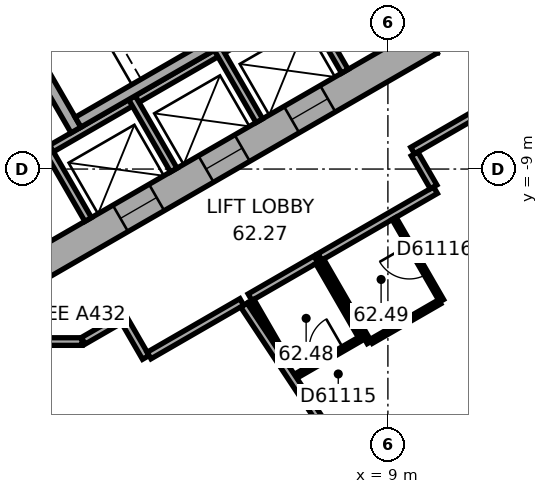
"""IFC4 building model, lengths in metres.
Left out: names, types, materials, properties, quantities, classifications, styles, units other than length and angle.
Written with IfcOpenShell. Run it as: python <this file> out.ifc"""

import sys

from ifc_helpers import new_model, si_unit, direction, frame, frame_2d, origin, place, context, subcontext, project, spatial, rectangle, extrude, element, fill, save


model = new_model("IFC4")
c1 = context("Model", 3, precision=1e-05, world=origin(), true_north=direction((0.0, 1.0)))
c2 = subcontext(c1, "Body", "Model", "MODEL_VIEW")
j1 = project(units=[si_unit("LENGTHUNIT", "METRE"), si_unit("PLANEANGLEUNIT", "RADIAN")], contexts=[c1])
p1 = place(None, origin())
s1 = spatial("IfcSite", under=j1, at=p1, CompositionType="ELEMENT")
p2 = place(p1, origin())
s2 = spatial("IfcBuilding", under=s1, at=p2, CompositionType="ELEMENT")
p3 = place(p2, frame((0.0, 0.0, 251.3)))
s3 = spatial("IfcBuildingStorey", under=s2, at=p3, CompositionType="ELEMENT", Elevation=251.3)
p4 = place(p3, frame((9.9, -5.947, 0.0), z_axis=(0.0, 0.0, 1.0), x_axis=(0.0, 1.0, 0.0)))
e1 = element("IfcWall", 1, at=p4, inside=s3, PredefinedType="SHEAR", context=c2, shape_type="SweptSolid", body=[
    extrude(rectangle(XDim=11.894, YDim=0.8, at=frame_2d((5.947, 0.0))), origin(), (0.0, 0.0, 1.0), 3.7),
])
p5 = place(p4, frame((6.147, 0.0, 0.0)))
e2 = element("IfcOpeningElement", 2, at=p5, cuts=e1, PredefinedType="OPENING", context=c2, shape_type="SweptSolid", body=[
    extrude(rectangle(XDim=1.5, YDim=2.1, at=frame_2d((0.75, 1.05))), frame((0.0, 0.41, 0.0), z_axis=(0.0, -1.0, 0.0), x_axis=(1.0, 0.0, 0.0)), (0.0, 0.0, 1.0), 0.82),
])
p6 = place(p4, frame((1.697, 0.0, 0.0)))
e3 = element("IfcOpeningElement", 3, at=p6, cuts=e1, PredefinedType="OPENING", context=c2, shape_type="SweptSolid", body=[
    extrude(rectangle(XDim=0.9, YDim=2.1, at=frame_2d((0.45, 1.05))), frame((0.0, 0.41, 0.0), z_axis=(0.0, -1.0, 0.0), x_axis=(1.0, 0.0, 0.0)), (0.0, 0.0, 1.0), 0.82),
])
p7 = place(p4, frame((4.297, 0.0, 0.0)))
e4 = element("IfcOpeningElement", 4, at=p7, cuts=e1, PredefinedType="OPENING", context=c2, shape_type="SweptSolid", body=[
    extrude(rectangle(XDim=0.9, YDim=2.1, at=frame_2d((0.45, 1.05))), frame((0.0, 0.41, 0.0), z_axis=(0.0, -1.0, 0.0), x_axis=(1.0, 0.0, 0.0)), (0.0, 0.0, 1.0), 0.82),
])
p8 = place(p3, frame((-10.1, -5.6, 0.0), z_axis=(0.0, 0.0, 1.0), x_axis=(0.866023897231, -0.500002609418, 0.0)))
e5 = element("IfcWall", 5, at=p8, inside=s3, PredefinedType="SHEAR", context=c2, shape_type="SweptSolid", body=[
    extrude(rectangle(XDim=11.894, YDim=0.8, at=frame_2d((5.947, 0.0))), origin(), (0.0, 0.0, 1.0), 3.7),
])
p9 = place(p8, frame((6.147, 0.0, 0.0)))
e6 = element("IfcOpeningElement", 6, at=p9, cuts=e5, PredefinedType="OPENING", context=c2, shape_type="SweptSolid", body=[
    extrude(rectangle(XDim=1.5, YDim=2.1, at=frame_2d((0.75, 1.05))), frame((0.0, 0.41, 0.0), z_axis=(0.0, -1.0, 0.0), x_axis=(1.0, 0.0, 0.0)), (0.0, 0.0, 1.0), 0.82),
])
p10 = place(p8, frame((1.597, 0.0, 0.0)))
e7 = element("IfcOpeningElement", 7, at=p10, cuts=e5, PredefinedType="OPENING", context=c2, shape_type="SweptSolid", body=[
    extrude(rectangle(XDim=1.1, YDim=2.1, at=frame_2d((0.55, 1.05))), frame((0.0, 0.41, 0.0), z_axis=(0.0, -1.0, 0.0), x_axis=(1.0, 0.0, 0.0)), (0.0, 0.0, 1.0), 0.82),
])
p11 = place(p8, frame((4.197, 0.0, 0.0)))
e8 = element("IfcOpeningElement", 8, at=p11, cuts=e5, PredefinedType="OPENING", context=c2, shape_type="SweptSolid", body=[
    extrude(rectangle(XDim=1.1, YDim=2.1, at=frame_2d((0.55, 1.05))), frame((0.0, 0.41, 0.0), z_axis=(0.0, -1.0, 0.0), x_axis=(1.0, 0.0, 0.0)), (0.0, 0.0, 1.0), 0.82),
])
p12 = place(p3, frame((-0.2, -11.547, 0.0), z_axis=(0.0, 0.0, 1.0), x_axis=(0.866023897231, 0.500002609418, 0.0)))
e9 = element("IfcWall", 9, at=p12, inside=s3, PredefinedType="SHEAR", context=c2, shape_type="SweptSolid", body=[
    extrude(rectangle(XDim=11.894, YDim=0.8, at=frame_2d((5.947, 0.0))), origin(), (0.0, 0.0, 1.0), 3.7),
])
p13 = place(p12, frame((2.497, 0.0, 0.0)))
e10 = element("IfcOpeningElement", 10, at=p13, cuts=e9, PredefinedType="OPENING", context=c2, shape_type="SweptSolid", body=[
    extrude(rectangle(XDim=1.1, YDim=2.1, at=frame_2d((0.55, 1.05))), frame((0.0, 0.41, 0.0), z_axis=(0.0, -1.0, 0.0), x_axis=(1.0, 0.0, 0.0)), (0.0, 0.0, 1.0), 0.82),
])
p14 = place(p12, frame((5.097, 0.0, 0.0)))
e11 = element("IfcOpeningElement", 11, at=p14, cuts=e9, PredefinedType="OPENING", context=c2, shape_type="SweptSolid", body=[
    extrude(rectangle(XDim=1.1, YDim=2.1, at=frame_2d((0.55, 1.05))), frame((0.0, 0.41, 0.0), z_axis=(0.0, -1.0, 0.0), x_axis=(1.0, 0.0, 0.0)), (0.0, 0.0, 1.0), 0.82),
])
p15 = place(p12, frame((7.697, 0.0, 0.0)))
e12 = element("IfcOpeningElement", 12, at=p15, cuts=e9, PredefinedType="OPENING", context=c2, shape_type="SweptSolid", body=[
    extrude(rectangle(XDim=1.1, YDim=2.1, at=frame_2d((0.55, 1.05))), frame((0.0, 0.41, 0.0), z_axis=(0.0, -1.0, 0.0), x_axis=(1.0, 0.0, 0.0)), (0.0, 0.0, 1.0), 0.82),
])
p16 = place(p3, frame((2.739, -22.711, 0.0), z_axis=(0.0, 0.0, 1.0), x_axis=(0.833885723098, 0.551937134838, 0.0)))
e13 = element("IfcWall", 13, at=p16, inside=s3, PredefinedType="STANDARD", context=c2, shape_type="SweptSolid", body=[
    extrude(rectangle(XDim=18.841, YDim=0.2, at=frame_2d((9.421, 0.0))), origin(), (0.0, 0.0, 1.0), 3.7),
])
p17 = place(p16, frame((1.252, 0.0, 0.9)))
e14 = element("IfcOpeningElement", 14, at=p17, cuts=e13, PredefinedType="OPENING", context=c2, shape_type="SweptSolid", body=[
    extrude(rectangle(XDim=2.2, YDim=2.0, at=frame_2d((1.1, 1.0))), frame((0.0, 0.11, 0.0), z_axis=(0.0, -1.0, 0.0), x_axis=(1.0, 0.0, 0.0)), (0.0, 0.0, 1.0), 0.22),
])
p18 = place(p16, frame((4.786, 0.0, 0.9)))
e15 = element("IfcOpeningElement", 15, at=p18, cuts=e13, PredefinedType="OPENING", context=c2, shape_type="SweptSolid", body=[
    extrude(rectangle(XDim=2.2, YDim=2.0, at=frame_2d((1.1, 1.0))), frame((0.0, 0.11, 0.0), z_axis=(0.0, -1.0, 0.0), x_axis=(1.0, 0.0, 0.0)), (0.0, 0.0, 1.0), 0.22),
])
p19 = place(p16, frame((8.32, 0.0, 0.9)))
e16 = element("IfcOpeningElement", 16, at=p19, cuts=e13, PredefinedType="OPENING", context=c2, shape_type="SweptSolid", body=[
    extrude(rectangle(XDim=2.2, YDim=2.0, at=frame_2d((1.1, 1.0))), frame((0.0, 0.11, 0.0), z_axis=(0.0, -1.0, 0.0), x_axis=(1.0, 0.0, 0.0)), (0.0, 0.0, 1.0), 0.22),
])
p20 = place(p16, frame((11.854, 0.0, 0.9)))
e17 = element("IfcOpeningElement", 17, at=p20, cuts=e13, PredefinedType="OPENING", context=c2, shape_type="SweptSolid", body=[
    extrude(rectangle(XDim=2.2, YDim=2.0, at=frame_2d((1.1, 1.0))), frame((0.0, 0.11, 0.0), z_axis=(0.0, -1.0, 0.0), x_axis=(1.0, 0.0, 0.0)), (0.0, 0.0, 1.0), 0.22),
])
p21 = place(p16, frame((15.387, 0.0, 0.9)))
e18 = element("IfcOpeningElement", 18, at=p21, cuts=e13, PredefinedType="OPENING", context=c2, shape_type="SweptSolid", body=[
    extrude(rectangle(XDim=2.2, YDim=2.0, at=frame_2d((1.1, 1.0))), frame((0.0, 0.11, 0.0), z_axis=(0.0, -1.0, 0.0), x_axis=(1.0, 0.0, 0.0)), (0.0, 0.0, 1.0), 0.22),
])
p22 = place(p3, frame((-0.024, -8.559, 0.0), z_axis=(0.0, 0.0, 1.0), x_axis=(0.866026010844, 0.49999894854, 0.0)))
e19 = element("IfcWall", 19, at=p22, inside=s3, PredefinedType="PARTITIONING", context=c2, shape_type="SweptSolid", body=[
    extrude(rectangle(XDim=8.0, YDim=0.2, at=frame_2d((4.0, 0.0))), origin(), (0.0, 0.0, 1.0), 3.35),
])
for number, where, z_axis, x_axis in (
    (20, (0.013, -8.422, 0.0), (0.0, 0.0, 1.0), (0.5, -0.866, 0.0)),
    (21, (2.264, -7.122, 0.0), (0.0, 0.0, 1.0), (0.5, -0.866, 0.0)),
    (22, (4.516, -5.822, 0.0), (0.0, 0.0, 1.0), (0.5, -0.866, 0.0)),
    (23, (6.768, -4.522, 0.0), (0.0, 0.0, 1.0), (0.5, -0.866, 0.0)),
):
    element("IfcWall", number, at=place(p3, frame(where, z_axis=z_axis, x_axis=x_axis)), inside=s3, PredefinedType="PARTITIONING", context=c2, shape_type="SweptSolid", body=[
        extrude(rectangle(XDim=2.2, YDim=0.2, at=frame_2d((1.1, 0.0))), origin(), (0.0, 0.0, 1.0), 3.35),
    ])
p23 = place(p3, frame((-1.558, -3.902, 0.0), z_axis=(0.0, 0.0, 1.0), x_axis=(0.499977259774, -0.866038532462, 0.0)))
e24 = element("IfcWall", 24, at=p23, inside=s3, PredefinedType="SHEAR", context=c2, shape_type="SweptSolid", body=[
    extrude(rectangle(XDim=4.7, YDim=0.3, at=frame_2d((2.35, 0.0))), origin(), (0.0, 0.0, 1.0), 3.35),
])
p24 = place(p23, frame((0.8, 0.0, 0.0)))
e25 = element("IfcOpeningElement", 25, at=p24, cuts=e24, PredefinedType="OPENING", context=c2, shape_type="SweptSolid", body=[
    extrude(rectangle(XDim=1.2, YDim=2.1, at=frame_2d((0.6, 1.05))), frame((0.0, 0.16, 0.0), z_axis=(0.0, -1.0, 0.0), x_axis=(1.0, 0.0, 0.0)), (0.0, 0.0, 1.0), 0.32),
])
p25 = place(p3, frame((0.847, -7.767, 0.0), z_axis=(0.0, 0.0, 1.0), x_axis=(0.866027801685, 0.499995846692, 0.0)))
e26 = element("IfcWall", 26, at=p25, inside=s3, PredefinedType="SHEAR", context=c2, shape_type="SweptSolid", body=[
    extrude(rectangle(XDim=7.06, YDim=0.3, at=frame_2d((3.53, 0.0))), origin(), (0.0, 0.0, 1.0), 3.35),
])
p26 = place(p3, frame((-0.91, -13.539, 0.0), z_axis=(0.0, 0.0, 1.0), x_axis=(1.0, 0.0, 0.0)))
e27 = element("IfcWall", 27, at=p26, inside=s3, PredefinedType="PARTITIONING", context=c2, shape_type="SweptSolid", body=[
    extrude(rectangle(XDim=1.86, YDim=0.2, at=frame_2d((0.93, 0.0))), origin(), (0.0, 0.0, 1.0), 3.35),
])
p27 = place(p3, frame((0.985, -13.519, 0.0), z_axis=(0.0, 0.0, 1.0), x_axis=(0.866054082991, 0.499950322867, 0.0)))
e28 = element("IfcWall", 28, at=p27, inside=s3, PredefinedType="PARTITIONING", context=c2, shape_type="SweptSolid", body=[
    extrude(rectangle(XDim=1.206, YDim=0.2, at=frame_2d((0.603, 0.0))), origin(), (0.0, 0.0, 1.0), 3.35),
])
p28 = place(p3, frame((2.079, -13.003, 0.0), z_axis=(0.0, 0.0, 1.0), x_axis=(0.500074377092, -0.865982457891, 0.0)))
e29 = element("IfcWall", 29, at=p28, inside=s3, PredefinedType="PARTITIONING", context=c2, shape_type="SweptSolid", body=[
    extrude(rectangle(XDim=1.101, YDim=0.2, at=frame_2d((0.55, 0.0))), origin(), (0.0, 0.0, 1.0), 3.35),
])
p29 = place(p3, frame((2.716, -13.906, 0.0), z_axis=(0.0, 0.0, 1.0), x_axis=(0.866048512801, 0.499959971872, 0.0)))
e30 = element("IfcWall", 30, at=p29, inside=s3, PredefinedType="PARTITIONING", context=c2, shape_type="SweptSolid", body=[
    extrude(rectangle(XDim=2.818, YDim=0.2, at=frame_2d((1.409, 0.0))), origin(), (0.0, 0.0, 1.0), 3.35),
])
p30 = place(p3, frame((5.373, -12.372, 0.0), z_axis=(0.0, 0.0, 1.0), x_axis=(0.866010750942, 0.50002537861, 0.0)))
e31 = element("IfcWall", 31, at=p30, inside=s3, PredefinedType="PARTITIONING", context=c2, shape_type="SweptSolid", body=[
    extrude(rectangle(XDim=2.0, YDim=0.2, at=frame_2d((1.0, 0.0))), origin(), (0.0, 0.0, 1.0), 3.35),
])
p31 = place(p3, frame((6.107, -13.644, 0.0), z_axis=(0.0, 0.0, 1.0), x_axis=(-0.500072492706, 0.865983546056, 0.0)))
e32 = element("IfcWall", 32, at=p31, inside=s3, PredefinedType="PARTITIONING", context=c2, shape_type="SweptSolid", body=[
    extrude(rectangle(XDim=1.368, YDim=0.12, at=frame_2d((0.684, 0.0))), origin(), (0.0, 0.0, 1.0), 3.35),
])
p32 = place(p3, frame((7.155, -11.459, 0.0), z_axis=(0.0, 0.0, 1.0), x_axis=(0.500077740698, -0.865980515519, 0.0)))
e33 = element("IfcWall", 33, at=p32, inside=s3, PredefinedType="PARTITIONING", context=c2, shape_type="SweptSolid", body=[
    extrude(rectangle(XDim=2.3, YDim=0.12, at=frame_2d((1.15, 0.0))), origin(), (0.0, 0.0, 1.0), 3.35),
])
p33 = place(p3, frame((7.208, -11.312, 0.0), z_axis=(0.0, 0.0, 1.0), x_axis=(0.866050243185, 0.499956974429, 0.0)))
e34 = element("IfcWall", 34, at=p33, inside=s3, PredefinedType="PARTITIONING", context=c2, shape_type="SweptSolid", body=[
    extrude(rectangle(XDim=3.514, YDim=0.2, at=frame_2d((1.757, 0.0))), origin(), (0.0, 0.0, 1.0), 3.35),
])
p34 = place(p3, frame((8.253, -13.481, 0.0), z_axis=(0.0, 0.0, 1.0), x_axis=(-0.866045024864, -0.499966013754, 0.0)))
e35 = element("IfcWall", 35, at=p34, inside=s3, PredefinedType="PARTITIONING", context=c2, shape_type="SweptSolid", body=[
    extrude(rectangle(XDim=1.88, YDim=0.12, at=frame_2d((0.94, 0.0))), origin(), (0.0, 0.0, 1.0), 3.35),
])
p35 = place(p34, frame((0.49, 0.0, 0.0)))
e36 = element("IfcOpeningElement", 36, at=p35, cuts=e35, PredefinedType="OPENING", context=c2, shape_type="SweptSolid", body=[
    extrude(rectangle(XDim=0.9, YDim=2.1, at=frame_2d((0.45, 1.05))), frame((0.0, 0.07, 0.0), z_axis=(0.0, -1.0, 0.0), x_axis=(1.0, 0.0, 0.0)), (0.0, 0.0, 1.0), 0.14),
])
p36 = place(p3, frame((8.509, -13.564, 0.0), z_axis=(0.0, 0.0, 1.0), x_axis=(-0.500004234368, 0.866022959057, 0.0)))
e37 = element("IfcWall", 37, at=p36, inside=s3, PredefinedType="PARTITIONING", context=c2, shape_type="SweptSolid", body=[
    extrude(rectangle(XDim=2.5, YDim=0.12, at=frame_2d((1.25, 0.0))), origin(), (0.0, 0.0, 1.0), 3.35),
])
p37 = place(p3, frame((8.624, -17.737, 0.0), z_axis=(0.0, 0.0, 1.0), x_axis=(-0.551945242328, 0.833880356809, 0.0)))
e38 = element("IfcWall", 38, at=p37, inside=s3, PredefinedType="PARTITIONING", context=c2, shape_type="SweptSolid", body=[
    extrude(rectangle(XDim=6.183, YDim=0.2, at=frame_2d((3.091, 0.0))), origin(), (0.0, 0.0, 1.0), 2.65),
])
p38 = place(p3, frame((9.164, -10.299, 0.0), z_axis=(0.0, 0.0, 1.0), x_axis=(0.500004234368, -0.866022959057, 0.0)))
e39 = element("IfcWall", 39, at=p38, inside=s3, PredefinedType="PARTITIONING", context=c2, shape_type="SweptSolid", body=[
    extrude(rectangle(XDim=2.5, YDim=0.12, at=frame_2d((1.25, 0.0))), origin(), (0.0, 0.0, 1.0), 3.35),
])
p39 = place(p38, frame((0.8, 0.0, 0.0)))
e40 = element("IfcOpeningElement", 40, at=p39, cuts=e39, PredefinedType="OPENING", context=c2, shape_type="SweptSolid", body=[
    extrude(rectangle(XDim=0.9, YDim=2.1, at=frame_2d((0.45, 1.05))), frame((0.0, 0.07, 0.0), z_axis=(0.0, -1.0, 0.0), x_axis=(1.0, 0.0, 0.0)), (0.0, 0.0, 1.0), 0.14),
])
p40 = place(p3, frame((9.652, -8.515, 0.0), z_axis=(0.0, 0.0, 1.0), x_axis=(0.866020375458, 0.500008709215, 0.0)))
e41 = element("IfcWall", 41, at=p40, inside=s3, PredefinedType="PARTITIONING", context=c2, shape_type="SweptSolid", body=[
    extrude(rectangle(XDim=1.846, YDim=0.2, at=frame_2d((0.923, 0.0))), origin(), (0.0, 0.0, 1.0), 3.35),
])
p41 = place(p3, frame((10.202, -9.469, 0.0), z_axis=(0.0, 0.0, 1.0), x_axis=(-0.499968756647, 0.866043441391, 0.0)))
e42 = element("IfcWall", 42, at=p41, inside=s3, PredefinedType="PARTITIONING", context=c2, shape_type="SweptSolid", body=[
    extrude(rectangle(XDim=1.001, YDim=0.2, at=frame_2d((0.5, 0.0))), origin(), (0.0, 0.0, 1.0), 3.35),
])
p42 = place(p3, frame((10.362, -12.494, 0.0), z_axis=(0.0, 0.0, 1.0), x_axis=(-0.866009661879, -0.500027264788, 0.0)))
e43 = element("IfcWall", 43, at=p42, inside=s3, PredefinedType="PARTITIONING", context=c2, shape_type="SweptSolid", body=[
    extrude(rectangle(XDim=2.08, YDim=0.12, at=frame_2d((1.04, 0.0))), origin(), (0.0, 0.0, 1.0), 3.35),
])
p43 = place(p13, origin())
e44 = element("IfcDoor", 44, at=p43, inside=s3, OperationType="DOUBLE_DOOR_SLIDING", PredefinedType="DOOR", context=c2, shape_type="SweptSolid", body=[
    extrude(rectangle(XDim=1.1, YDim=2.1, at=frame_2d((0.55, 1.05))), frame((0.0, 0.025, 0.0), z_axis=(0.0, -1.0, 0.0), x_axis=(1.0, 0.0, 0.0)), (0.0, 0.0, 1.0), 0.05),
])
fill(e10, e44)
p44 = place(p14, origin())
e45 = element("IfcDoor", 45, at=p44, inside=s3, OperationType="DOUBLE_DOOR_SLIDING", PredefinedType="DOOR", context=c2, shape_type="SweptSolid", body=[
    extrude(rectangle(XDim=1.1, YDim=2.1, at=frame_2d((0.55, 1.05))), frame((0.0, 0.025, 0.0), z_axis=(0.0, -1.0, 0.0), x_axis=(1.0, 0.0, 0.0)), (0.0, 0.0, 1.0), 0.05),
])
fill(e11, e45)
p45 = place(p15, origin())
e46 = element("IfcDoor", 46, at=p45, inside=s3, OperationType="DOUBLE_DOOR_SLIDING", PredefinedType="DOOR", context=c2, shape_type="SweptSolid", body=[
    extrude(rectangle(XDim=1.1, YDim=2.1, at=frame_2d((0.55, 1.05))), frame((0.0, 0.025, 0.0), z_axis=(0.0, -1.0, 0.0), x_axis=(1.0, 0.0, 0.0)), (0.0, 0.0, 1.0), 0.05),
])
fill(e12, e46)
p46 = place(p35, origin())
e47 = element("IfcDoor", 47, at=p46, inside=s3, OperationType="SINGLE_SWING_LEFT", PredefinedType="DOOR", context=c2, shape_type="SweptSolid", body=[
    extrude(rectangle(XDim=0.9, YDim=2.1, at=frame_2d((0.45, 1.05))), frame((0.0, 0.025, 0.0), z_axis=(0.0, -1.0, 0.0), x_axis=(1.0, 0.0, 0.0)), (0.0, 0.0, 1.0), 0.05),
])
fill(e36, e47)
p47 = place(p39, origin())
e48 = element("IfcDoor", 48, at=p47, inside=s3, OperationType="SINGLE_SWING_LEFT", PredefinedType="DOOR", context=c2, shape_type="SweptSolid", body=[
    extrude(rectangle(XDim=0.9, YDim=2.1, at=frame_2d((0.45, 1.05))), frame((0.0, 0.025, 0.0), z_axis=(0.0, -1.0, 0.0), x_axis=(1.0, 0.0, 0.0)), (0.0, 0.0, 1.0), 0.05),
])
fill(e40, e48)
save(model, sys.argv[1])
